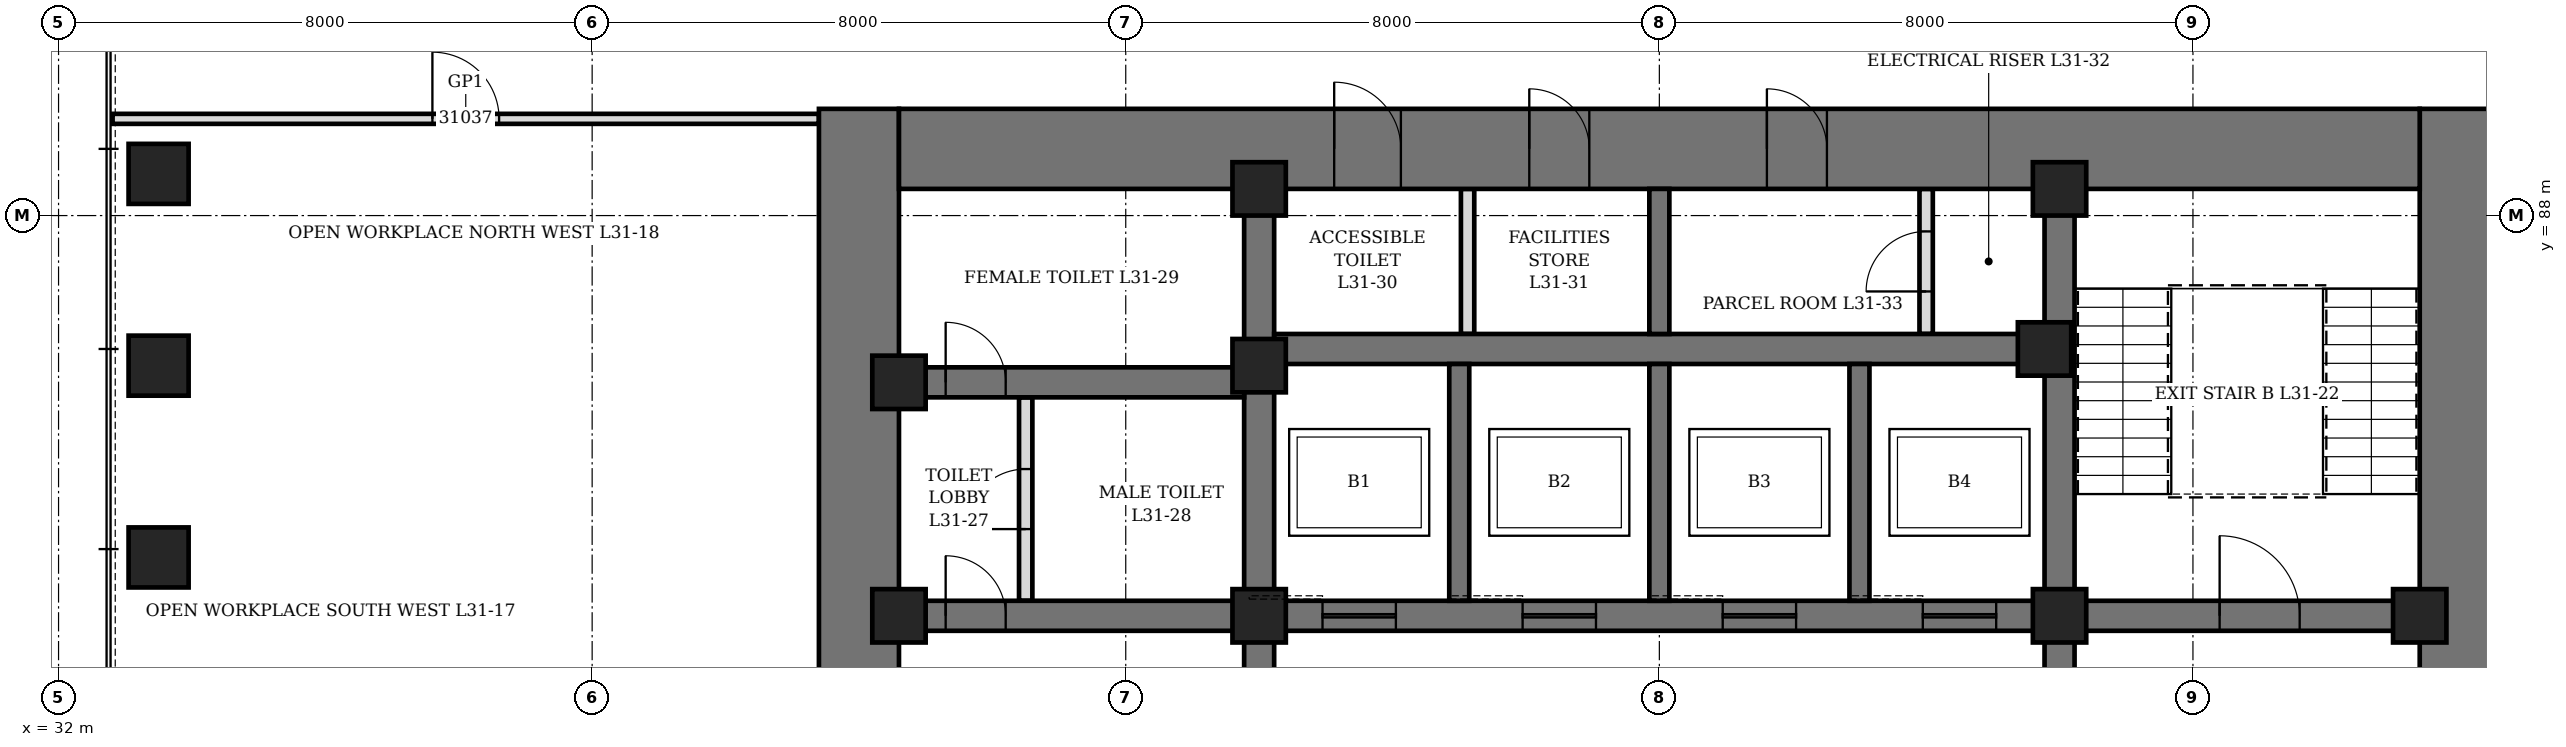
"""IFC4 building model, lengths in metres.
Left out: names, types, materials, properties, quantities, classifications, styles, units other than length and angle.
Written with IfcOpenShell. Run it as: python <this file> out.ifc"""

import sys

from ifc_helpers import new_model, si_unit, direction, frame, frame_2d, origin, origin_2d, place, context, subcontext, project, spatial, rectangle, hollow_rectangle, extrude, element, fill, save


model = new_model("IFC4")
c1 = context("Model", 3, precision=1e-05, world=origin(), true_north=direction((0.0, 1.0)))
c2 = subcontext(c1, "Body", "Model", "MODEL_VIEW")
j1 = project(units=[si_unit("LENGTHUNIT", "METRE"), si_unit("PLANEANGLEUNIT", "RADIAN")], contexts=[c1])
p1 = place(None, origin())
s1 = spatial("IfcSite", under=j1, at=p1, CompositionType="ELEMENT")
p2 = place(p1, origin())
s2 = spatial("IfcBuilding", under=s1, at=p2, CompositionType="ELEMENT")
p3 = place(p2, frame((0.0, 0.0, 141.7)))
s3 = spatial("IfcBuildingStorey", under=s2, at=p3, CompositionType="ELEMENT", Elevation=141.7)
for number, where, z_axis, x_axis in (
    (1, (33.5, 88.625, 0.0), (0.0, 0.0, 1.0), (0.0, 1.0, 0.0)),
    (2, (33.5, 85.75, 0.0), (0.0, 0.0, 1.0), (0.0, 1.0, 0.0)),
    (3, (33.5, 82.875, 0.0), (0.0, 0.0, 1.0), (0.0, 1.0, 0.0)),
):
    element("IfcColumn", number, at=place(p3, frame(where, z_axis=z_axis, x_axis=x_axis)), inside=s3, PredefinedType="COLUMN", context=c2, shape_type="SweptSolid", body=[
        extrude(hollow_rectangle(XDim=0.9, YDim=0.9, WallThickness=0.12, at=origin_2d()), origin(), (0.0, 0.0, 1.0), 4.2),
    ])
p4 = place(p3, frame((44.0, 70.4, 0.0), z_axis=(0.0, 0.0, 1.0), x_axis=(0.0, 1.0, 0.0)))
e4 = element("IfcWall", 4, at=p4, inside=s3, PredefinedType="SHEAR", context=c2, shape_type="SweptSolid", body=[
    extrude(rectangle(XDim=19.2, YDim=1.2, at=frame_2d((9.6, 0.0))), origin(), (0.0, 0.0, 1.0), 4.2),
])
p5 = place(p4, frame((8.6, 0.0, 0.0)))
e5 = element("IfcOpeningElement", 5, at=p5, cuts=e4, PredefinedType="OPENING", context=c2, shape_type="SweptSolid", body=[
    extrude(rectangle(XDim=2.0, YDim=2.4, at=frame_2d((1.0, 1.2))), frame((0.0, 0.61, 0.0), z_axis=(0.0, -1.0, 0.0), x_axis=(1.0, 0.0, 0.0)), (0.0, 0.0, 1.0), 1.22),
])
p6 = place(p3, frame((68.0, 70.4, 0.0), z_axis=(0.0, 0.0, 1.0), x_axis=(0.0, 1.0, 0.0)))
e6 = element("IfcWall", 6, at=p6, inside=s3, PredefinedType="SHEAR", context=c2, shape_type="SweptSolid", body=[
    extrude(rectangle(XDim=19.2, YDim=1.2, at=frame_2d((9.6, 0.0))), origin(), (0.0, 0.0, 1.0), 4.2),
])
p7 = place(p6, frame((8.6, 0.0, 0.0)))
e7 = element("IfcOpeningElement", 7, at=p7, cuts=e6, PredefinedType="OPENING", context=c2, shape_type="SweptSolid", body=[
    extrude(rectangle(XDim=2.0, YDim=2.4, at=frame_2d((1.0, 1.2))), frame((0.0, 0.61, 0.0), z_axis=(0.0, -1.0, 0.0), x_axis=(1.0, 0.0, 0.0)), (0.0, 0.0, 1.0), 1.22),
])
p8 = place(p3, frame((44.6, 89.0, 0.0), z_axis=(0.0, 0.0, 1.0), x_axis=(1.0, 0.0, 0.0)))
e8 = element("IfcWall", 8, at=p8, inside=s3, PredefinedType="SHEAR", context=c2, shape_type="SweptSolid", body=[
    extrude(rectangle(XDim=22.8, YDim=1.2, at=frame_2d((11.4, 0.0))), origin(), (0.0, 0.0, 1.0), 4.2),
])
p9 = place(p8, frame((6.525, 0.0, 0.0)))
e9 = element("IfcOpeningElement", 9, at=p9, cuts=e8, PredefinedType="OPENING", context=c2, shape_type="SweptSolid", body=[
    extrude(rectangle(XDim=1.0, YDim=2.1, at=frame_2d((0.5, 1.05))), frame((0.0, 0.61, 0.0), z_axis=(0.0, -1.0, 0.0), x_axis=(1.0, 0.0, 0.0)), (0.0, 0.0, 1.0), 1.22),
])
p10 = place(p8, frame((9.45, 0.0, 0.0)))
e10 = element("IfcOpeningElement", 10, at=p10, cuts=e8, PredefinedType="OPENING", context=c2, shape_type="SweptSolid", body=[
    extrude(rectangle(XDim=0.9, YDim=2.1, at=frame_2d((0.45, 1.05))), frame((0.0, 0.61, 0.0), z_axis=(0.0, -1.0, 0.0), x_axis=(1.0, 0.0, 0.0)), (0.0, 0.0, 1.0), 1.22),
])
p11 = place(p8, frame((13.012, 0.0, 0.0)))
e11 = element("IfcOpeningElement", 11, at=p11, cuts=e8, PredefinedType="OPENING", context=c2, shape_type="SweptSolid", body=[
    extrude(rectangle(XDim=0.9, YDim=2.1, at=frame_2d((0.45, 1.05))), frame((0.0, 0.61, 0.0), z_axis=(0.0, -1.0, 0.0), x_axis=(1.0, 0.0, 0.0)), (0.0, 0.0, 1.0), 1.22),
])
p12 = place(p3, frame((50.0, 71.6, 0.0), z_axis=(0.0, 0.0, 1.0), x_axis=(0.0, 1.0, 0.0)))
e12 = element("IfcWall", 12, at=p12, inside=s3, PredefinedType="SHEAR", context=c2, shape_type="SweptSolid", body=[
    extrude(rectangle(XDim=16.8, YDim=0.45, at=frame_2d((8.4, 0.0))), origin(), (0.0, 0.0, 1.0), 4.2),
])
p13 = place(p12, frame((7.5, 0.0, 0.0)))
e13 = element("IfcOpeningElement", 13, at=p13, cuts=e12, PredefinedType="OPENING", context=c2, shape_type="SweptSolid", body=[
    extrude(rectangle(XDim=1.8, YDim=2.4, at=frame_2d((0.9, 1.2))), frame((0.0, 0.235, 0.0), z_axis=(0.0, -1.0, 0.0), x_axis=(1.0, 0.0, 0.0)), (0.0, 0.0, 1.0), 0.47),
])
p14 = place(p3, frame((62.0, 71.6, 0.0), z_axis=(0.0, 0.0, 1.0), x_axis=(0.0, 1.0, 0.0)))
e14 = element("IfcWall", 14, at=p14, inside=s3, PredefinedType="SHEAR", context=c2, shape_type="SweptSolid", body=[
    extrude(rectangle(XDim=16.8, YDim=0.45, at=frame_2d((8.4, 0.0))), origin(), (0.0, 0.0, 1.0), 4.2),
])
p15 = place(p14, frame((7.5, 0.0, 0.0)))
e15 = element("IfcOpeningElement", 15, at=p15, cuts=e14, PredefinedType="OPENING", context=c2, shape_type="SweptSolid", body=[
    extrude(rectangle(XDim=1.8, YDim=2.4, at=frame_2d((0.9, 1.2))), frame((0.0, 0.235, 0.0), z_axis=(0.0, -1.0, 0.0), x_axis=(1.0, 0.0, 0.0)), (0.0, 0.0, 1.0), 0.47),
])
p16 = place(p3, frame((44.6, 82.0, 0.0), z_axis=(0.0, 0.0, 1.0), x_axis=(1.0, 0.0, 0.0)))
e16 = element("IfcWall", 16, at=p16, inside=s3, PredefinedType="SHEAR", context=c2, shape_type="SweptSolid", body=[
    extrude(rectangle(XDim=5.175, YDim=0.45, at=frame_2d((2.587, 0.0))), origin(), (0.0, 0.0, 1.0), 4.2),
])
p17 = place(p16, frame((0.7, 0.0, 0.0)))
e17 = element("IfcOpeningElement", 17, at=p17, cuts=e16, PredefinedType="OPENING", context=c2, shape_type="SweptSolid", body=[
    extrude(rectangle(XDim=0.9, YDim=2.1, at=frame_2d((0.45, 1.05))), frame((0.0, 0.235, 0.0), z_axis=(0.0, -1.0, 0.0), x_axis=(1.0, 0.0, 0.0)), (0.0, 0.0, 1.0), 0.47),
])
p18 = place(p3, frame((44.6, 85.5, 0.0), z_axis=(0.0, 0.0, 1.0), x_axis=(1.0, 0.0, 0.0)))
e18 = element("IfcWall", 18, at=p18, inside=s3, PredefinedType="SHEAR", context=c2, shape_type="SweptSolid", body=[
    extrude(rectangle(XDim=5.175, YDim=0.45, at=frame_2d((2.587, 0.0))), origin(), (0.0, 0.0, 1.0), 4.2),
])
p19 = place(p18, frame((0.7, 0.0, 0.0)))
e19 = element("IfcOpeningElement", 19, at=p19, cuts=e18, PredefinedType="OPENING", context=c2, shape_type="SweptSolid", body=[
    extrude(rectangle(XDim=0.9, YDim=2.1, at=frame_2d((0.45, 1.05))), frame((0.0, 0.235, 0.0), z_axis=(0.0, -1.0, 0.0), x_axis=(1.0, 0.0, 0.0)), (0.0, 0.0, 1.0), 0.47),
])
p20 = place(p3, frame((62.225, 82.0, 0.0), z_axis=(0.0, 0.0, 1.0), x_axis=(1.0, 0.0, 0.0)))
e20 = element("IfcWall", 20, at=p20, inside=s3, PredefinedType="SHEAR", context=c2, shape_type="SweptSolid", body=[
    extrude(rectangle(XDim=5.175, YDim=0.45, at=frame_2d((2.587, 0.0))), origin(), (0.0, 0.0, 1.0), 4.2),
])
p21 = place(p20, frame((2.175, 0.0, 0.0)))
e21 = element("IfcOpeningElement", 21, at=p21, cuts=e20, PredefinedType="OPENING", context=c2, shape_type="SweptSolid", body=[
    extrude(rectangle(XDim=1.2, YDim=2.1, at=frame_2d((0.6, 1.05))), frame((0.0, 0.235, 0.0), z_axis=(0.0, -1.0, 0.0), x_axis=(1.0, 0.0, 0.0)), (0.0, 0.0, 1.0), 0.47),
])
p22 = place(p3, frame((50.225, 82.0, 0.0), z_axis=(0.0, 0.0, 1.0), x_axis=(1.0, 0.0, 0.0)))
e22 = element("IfcWall", 22, at=p22, inside=s3, PredefinedType="SHEAR", context=c2, shape_type="SweptSolid", body=[
    extrude(rectangle(XDim=11.55, YDim=0.45, at=frame_2d((5.775, 0.0))), origin(), (0.0, 0.0, 1.0), 4.2),
])
p23 = place(p22, frame((0.725, 0.0, 0.0)))
e23 = element("IfcOpeningElement", 23, at=p23, cuts=e22, PredefinedType="OPENING", context=c2, shape_type="SweptSolid", body=[
    extrude(rectangle(XDim=1.1, YDim=2.2, at=frame_2d((0.55, 1.1))), frame((0.0, 0.235, 0.0), z_axis=(0.0, -1.0, 0.0), x_axis=(1.0, 0.0, 0.0)), (0.0, 0.0, 1.0), 0.47),
])
p24 = place(p22, frame((3.725, 0.0, 0.0)))
e24 = element("IfcOpeningElement", 24, at=p24, cuts=e22, PredefinedType="OPENING", context=c2, shape_type="SweptSolid", body=[
    extrude(rectangle(XDim=1.1, YDim=2.2, at=frame_2d((0.55, 1.1))), frame((0.0, 0.235, 0.0), z_axis=(0.0, -1.0, 0.0), x_axis=(1.0, 0.0, 0.0)), (0.0, 0.0, 1.0), 0.47),
])
p25 = place(p22, frame((6.725, 0.0, 0.0)))
e25 = element("IfcOpeningElement", 25, at=p25, cuts=e22, PredefinedType="OPENING", context=c2, shape_type="SweptSolid", body=[
    extrude(rectangle(XDim=1.1, YDim=2.2, at=frame_2d((0.55, 1.1))), frame((0.0, 0.235, 0.0), z_axis=(0.0, -1.0, 0.0), x_axis=(1.0, 0.0, 0.0)), (0.0, 0.0, 1.0), 0.47),
])
p26 = place(p22, frame((9.725, 0.0, 0.0)))
e26 = element("IfcOpeningElement", 26, at=p26, cuts=e22, PredefinedType="OPENING", context=c2, shape_type="SweptSolid", body=[
    extrude(rectangle(XDim=1.1, YDim=2.2, at=frame_2d((0.55, 1.1))), frame((0.0, 0.235, 0.0), z_axis=(0.0, -1.0, 0.0), x_axis=(1.0, 0.0, 0.0)), (0.0, 0.0, 1.0), 0.47),
])
p27 = place(p3, frame((50.225, 86.0, 0.0), z_axis=(0.0, 0.0, 1.0), x_axis=(1.0, 0.0, 0.0)))
e27 = element("IfcWall", 27, at=p27, inside=s3, PredefinedType="SHEAR", context=c2, shape_type="SweptSolid", body=[
    extrude(rectangle(XDim=11.55, YDim=0.45, at=frame_2d((5.775, 0.0))), origin(), (0.0, 0.0, 1.0), 4.2),
])
for number, where, z_axis, x_axis in (
    (28, (53.0, 82.225, 0.0), (0.0, 0.0, 1.0), (0.0, 1.0, 0.0)),
    (29, (56.0, 82.225, 0.0), (0.0, 0.0, 1.0), (0.0, 1.0, 0.0)),
    (30, (59.0, 82.225, 0.0), (0.0, 0.0, 1.0), (0.0, 1.0, 0.0)),
):
    element("IfcWall", number, at=place(p3, frame(where, z_axis=z_axis, x_axis=x_axis)), inside=s3, PredefinedType="SHEAR", context=c2, shape_type="SweptSolid", body=[
        extrude(rectangle(XDim=3.55, YDim=0.3, at=frame_2d((1.775, 0.0))), origin(), (0.0, 0.0, 1.0), 4.2),
    ])
p28 = place(p3, frame((56.0, 86.225, 0.0), z_axis=(0.0, 0.0, 1.0), x_axis=(0.0, 1.0, 0.0)))
e31 = element("IfcWall", 31, at=p28, inside=s3, PredefinedType="SHEAR", context=c2, shape_type="SweptSolid", body=[
    extrude(rectangle(XDim=2.175, YDim=0.3, at=frame_2d((1.087, 0.0))), origin(), (0.0, 0.0, 1.0), 4.2),
])
for number, where, z_axis, x_axis in (
    (32, (44.6, 82.0, 0.0), (0.0, 0.0, 1.0), (1.0, 0.0, 0.0)),
    (33, (44.6, 85.5, 0.0), (0.0, 0.0, 1.0), (1.0, 0.0, 0.0)),
    (34, (50.0, 82.0, 0.0), (0.0, 0.0, 1.0), (1.0, 0.0, 0.0)),
    (35, (50.0, 85.75, 0.0), (0.0, 0.0, 1.0), (1.0, 0.0, 0.0)),
    (36, (50.0, 88.4, 0.0), (0.0, 0.0, 1.0), (1.0, 0.0, 0.0)),
    (37, (61.775, 86.0, 0.0), (0.0, 0.0, 1.0), (1.0, 0.0, 0.0)),
    (38, (62.0, 82.0, 0.0), (0.0, 0.0, 1.0), (1.0, 0.0, 0.0)),
    (39, (62.0, 88.4, 0.0), (0.0, 0.0, 1.0), (1.0, 0.0, 0.0)),
    (40, (67.4, 82.0, 0.0), (0.0, 0.0, 1.0), (1.0, 0.0, 0.0)),
):
    element("IfcColumn", number, at=place(p3, frame(where, z_axis=z_axis, x_axis=x_axis)), inside=s3, PredefinedType="COLUMN", context=c2, shape_type="SweptSolid", body=[
        extrude(hollow_rectangle(XDim=0.8, YDim=0.8, WallThickness=0.1, at=origin_2d()), origin(), (0.0, 0.0, 1.0), 4.2),
    ])
p29 = place(p3, frame((46.5, 82.225, 0.0), z_axis=(0.0, 0.0, 1.0), x_axis=(0.0, 1.0, 0.0)))
e41 = element("IfcWall", 41, at=p29, inside=s3, PredefinedType="PARTITIONING", context=c2, shape_type="SweptSolid", body=[
    extrude(rectangle(XDim=3.05, YDim=0.2, at=frame_2d((1.525, 0.0))), origin(), (0.0, 0.0, 1.0), 4.04),
])
p30 = place(p29, frame((1.075, 0.0, 0.0)))
e42 = element("IfcOpeningElement", 42, at=p30, cuts=e41, PredefinedType="OPENING", context=c2, shape_type="SweptSolid", body=[
    extrude(rectangle(XDim=0.9, YDim=2.1, at=frame_2d((0.45, 1.05))), frame((0.0, 0.11, 0.0), z_axis=(0.0, -1.0, 0.0), x_axis=(1.0, 0.0, 0.0)), (0.0, 0.0, 1.0), 0.22),
])
p31 = place(p3, frame((53.125, 86.225, 0.0), z_axis=(0.0, 0.0, 1.0), x_axis=(0.0, 1.0, 0.0)))
e43 = element("IfcWall", 43, at=p31, inside=s3, PredefinedType="PARTITIONING", context=c2, shape_type="SweptSolid", body=[
    extrude(rectangle(XDim=2.175, YDim=0.2, at=frame_2d((1.087, 0.0))), origin(), (0.0, 0.0, 1.0), 3.14),
])
p32 = place(p3, frame((60.0, 86.225, 0.0), z_axis=(0.0, 0.0, 1.0), x_axis=(0.0, 1.0, 0.0)))
e44 = element("IfcWall", 44, at=p32, inside=s3, PredefinedType="PARTITIONING", context=c2, shape_type="SweptSolid", body=[
    extrude(rectangle(XDim=2.175, YDim=0.2, at=frame_2d((1.087, 0.0))), origin(), (0.0, 0.0, 1.0), 4.04),
])
p33 = place(p32, frame((0.637, 0.0, 0.0)))
e45 = element("IfcOpeningElement", 45, at=p33, cuts=e44, PredefinedType="OPENING", context=c2, shape_type="SweptSolid", body=[
    extrude(rectangle(XDim=0.9, YDim=2.1, at=frame_2d((0.45, 1.05))), frame((0.0, 0.11, 0.0), z_axis=(0.0, -1.0, 0.0), x_axis=(1.0, 0.0, 0.0)), (0.0, 0.0, 1.0), 0.22),
])
p34 = place(p3, frame((32.81, 89.45, 0.0), z_axis=(0.0, 0.0, 1.0), x_axis=(1.0, 0.0, 0.0)))
e46 = element("IfcWall", 46, at=p34, inside=s3, PredefinedType="PARTITIONING", context=c2, shape_type="SweptSolid", body=[
    extrude(rectangle(XDim=10.59, YDim=0.15, at=frame_2d((5.295, 0.0))), origin(), (0.0, 0.0, 1.0), 4.04),
])
p35 = place(p34, frame((4.795, 0.0, 0.0)))
e47 = element("IfcOpeningElement", 47, at=p35, cuts=e46, PredefinedType="OPENING", context=c2, shape_type="SweptSolid", body=[
    extrude(rectangle(XDim=1.0, YDim=2.4, at=frame_2d((0.5, 1.2))), frame((0.0, 0.085, 0.0), z_axis=(0.0, -1.0, 0.0), x_axis=(1.0, 0.0, 0.0)), (0.0, 0.0, 1.0), 0.17),
])
p36 = place(p17, origin())
e48 = element("IfcDoor", 48, at=p36, inside=s3, OperationType="SINGLE_SWING_LEFT", PredefinedType="DOOR", context=c2, shape_type="SweptSolid", body=[
    extrude(rectangle(XDim=0.9, YDim=2.1, at=frame_2d((0.45, 1.05))), frame((0.0, 0.225, 0.0), z_axis=(0.0, -1.0, 0.0), x_axis=(1.0, 0.0, 0.0)), (0.0, 0.0, 1.0), 0.449),
])
fill(e17, e48)
p37 = place(p30, origin())
e49 = element("IfcDoor", 49, at=p37, inside=s3, OperationType="SINGLE_SWING_RIGHT", PredefinedType="DOOR", context=c2, shape_type="SweptSolid", body=[
    extrude(rectangle(XDim=0.9, YDim=2.1, at=frame_2d((0.45, 1.05))), frame((0.0, 0.1, 0.0), z_axis=(0.0, -1.0, 0.0), x_axis=(1.0, 0.0, 0.0)), (0.0, 0.0, 1.0), 0.199),
])
fill(e42, e49)
p38 = place(p19, origin())
e50 = element("IfcDoor", 50, at=p38, inside=s3, OperationType="SINGLE_SWING_RIGHT", PredefinedType="DOOR", context=c2, shape_type="SweptSolid", body=[
    extrude(rectangle(XDim=0.9, YDim=2.1, at=frame_2d((0.45, 1.05))), frame((0.0, 0.225, 0.0), z_axis=(0.0, -1.0, 0.0), x_axis=(1.0, 0.0, 0.0)), (0.0, 0.0, 1.0), 0.449),
])
fill(e19, e50)
p39 = place(p9, origin())
e51 = element("IfcDoor", 51, at=p39, inside=s3, OperationType="SINGLE_SWING_LEFT", PredefinedType="DOOR", context=c2, shape_type="SweptSolid", body=[
    extrude(rectangle(XDim=1.0, YDim=2.1, at=frame_2d((0.5, 1.05))), frame((0.0, 0.35, 0.0), z_axis=(0.0, -1.0, 0.0), x_axis=(1.0, 0.0, 0.0)), (0.0, 0.0, 1.0), 0.7),
])
fill(e9, e51)
p40 = place(p10, origin())
e52 = element("IfcDoor", 52, at=p40, inside=s3, OperationType="SINGLE_SWING_LEFT", PredefinedType="DOOR", context=c2, shape_type="SweptSolid", body=[
    extrude(rectangle(XDim=0.9, YDim=2.1, at=frame_2d((0.45, 1.05))), frame((0.0, 0.35, 0.0), z_axis=(0.0, -1.0, 0.0), x_axis=(1.0, 0.0, 0.0)), (0.0, 0.0, 1.0), 0.7),
])
fill(e10, e52)
p41 = place(p11, origin())
e53 = element("IfcDoor", 53, at=p41, inside=s3, OperationType="SINGLE_SWING_LEFT", PredefinedType="DOOR", context=c2, shape_type="SweptSolid", body=[
    extrude(rectangle(XDim=0.9, YDim=2.1, at=frame_2d((0.45, 1.05))), frame((0.0, 0.35, 0.0), z_axis=(0.0, -1.0, 0.0), x_axis=(1.0, 0.0, 0.0)), (0.0, 0.0, 1.0), 0.7),
])
fill(e11, e53)
p42 = place(p33, origin())
e54 = element("IfcDoor", 54, at=p42, inside=s3, OperationType="SINGLE_SWING_LEFT", PredefinedType="DOOR", context=c2, shape_type="SweptSolid", body=[
    extrude(rectangle(XDim=0.9, YDim=2.1, at=frame_2d((0.45, 1.05))), frame((0.0, 0.1, 0.0), z_axis=(0.0, -1.0, 0.0), x_axis=(1.0, 0.0, 0.0)), (0.0, 0.0, 1.0), 0.199),
])
fill(e45, e54)
p43 = place(p21, origin())
e55 = element("IfcDoor", 55, at=p43, inside=s3, OperationType="SINGLE_SWING_LEFT", PredefinedType="DOOR", context=c2, shape_type="SweptSolid", body=[
    extrude(rectangle(XDim=1.2, YDim=2.1, at=frame_2d((0.6, 1.05))), frame((0.0, 0.225, 0.0), z_axis=(0.0, -1.0, 0.0), x_axis=(1.0, 0.0, 0.0)), (0.0, 0.0, 1.0), 0.449),
])
fill(e21, e55)
p44 = place(p23, origin())
e56 = element("IfcDoor", 56, at=p44, inside=s3, OperationType="SLIDING_TO_LEFT", PredefinedType="DOOR", context=c2, shape_type="SweptSolid", body=[
    extrude(rectangle(XDim=1.1, YDim=2.2, at=frame_2d((0.55, 1.1))), frame((0.0, 0.225, 0.0), z_axis=(0.0, -1.0, 0.0), x_axis=(1.0, 0.0, 0.0)), (0.0, 0.0, 1.0), 0.449),
])
fill(e23, e56)
p45 = place(p24, origin())
e57 = element("IfcDoor", 57, at=p45, inside=s3, OperationType="SLIDING_TO_LEFT", PredefinedType="DOOR", context=c2, shape_type="SweptSolid", body=[
    extrude(rectangle(XDim=1.1, YDim=2.2, at=frame_2d((0.55, 1.1))), frame((0.0, 0.225, 0.0), z_axis=(0.0, -1.0, 0.0), x_axis=(1.0, 0.0, 0.0)), (0.0, 0.0, 1.0), 0.449),
])
fill(e24, e57)
p46 = place(p25, origin())
e58 = element("IfcDoor", 58, at=p46, inside=s3, OperationType="SLIDING_TO_LEFT", PredefinedType="DOOR", context=c2, shape_type="SweptSolid", body=[
    extrude(rectangle(XDim=1.1, YDim=2.2, at=frame_2d((0.55, 1.1))), frame((0.0, 0.225, 0.0), z_axis=(0.0, -1.0, 0.0), x_axis=(1.0, 0.0, 0.0)), (0.0, 0.0, 1.0), 0.449),
])
fill(e25, e58)
p47 = place(p26, origin())
e59 = element("IfcDoor", 59, at=p47, inside=s3, OperationType="SLIDING_TO_LEFT", PredefinedType="DOOR", context=c2, shape_type="SweptSolid", body=[
    extrude(rectangle(XDim=1.1, YDim=2.2, at=frame_2d((0.55, 1.1))), frame((0.0, 0.225, 0.0), z_axis=(0.0, -1.0, 0.0), x_axis=(1.0, 0.0, 0.0)), (0.0, 0.0, 1.0), 0.449),
])
fill(e26, e59)
p48 = place(p35, origin())
e60 = element("IfcDoor", 60, at=p48, inside=s3, OperationType="SINGLE_SWING_RIGHT", PredefinedType="DOOR", context=c2, shape_type="SweptSolid", body=[
    extrude(rectangle(XDim=1.0, YDim=2.4, at=frame_2d((0.5, 1.2))), frame((0.0, 0.075, 0.0), z_axis=(0.0, -1.0, 0.0), x_axis=(1.0, 0.0, 0.0)), (0.0, 0.0, 1.0), 0.149),
])
fill(e47, e60)
save(model, sys.argv[1])
